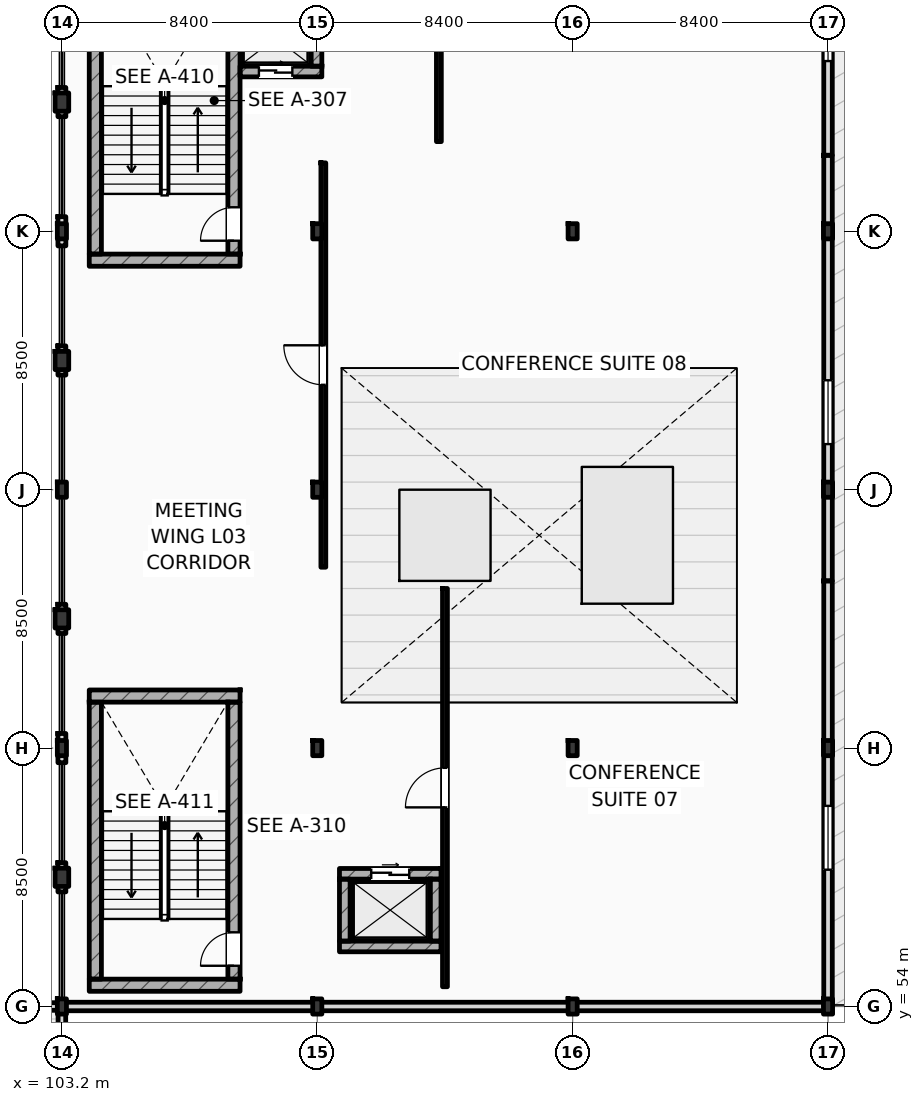
"""IFC4 building model, lengths in metres.
Left out: names, types, materials, properties, quantities, classifications, styles, units other than length and angle.
Written with IfcOpenShell. Run it as: python <this file> out.ifc"""

import sys

from ifc_helpers import new_model, si_unit, direction, frame, frame_2d, origin, origin_2d, place, context, subcontext, project, spatial, rectangle, i_section, extrude, element, fill, save


model = new_model("IFC4")
c1 = context("Model", 3, precision=1e-05, world=origin(), true_north=direction((0.0, 1.0)))
c2 = subcontext(c1, "Body", "Model", "MODEL_VIEW")
j1 = project(units=[si_unit("LENGTHUNIT", "METRE"), si_unit("PLANEANGLEUNIT", "RADIAN")], contexts=[c1])
p1 = place(None, origin())
s1 = spatial("IfcSite", under=j1, at=p1, CompositionType="ELEMENT")
p2 = place(p1, origin())
s2 = spatial("IfcBuilding", under=s1, at=p2, CompositionType="ELEMENT")
p3 = place(p2, frame((0.0, 0.0, 16.2)))
s3 = spatial("IfcBuildingStorey", under=s2, at=p3, CompositionType="ELEMENT", Elevation=16.2)
for number, where, z_axis, x_axis in (
    (1, (103.2, 54.0, 0.0), (0.0, 0.0, 1.0), (1.0, 0.0, 0.0)),
    (2, (103.2, 62.5, 0.0), (0.0, 0.0, 1.0), (1.0, 0.0, 0.0)),
    (3, (103.2, 71.0, 0.0), (0.0, 0.0, 1.0), (1.0, 0.0, 0.0)),
    (4, (103.2, 79.5, 0.0), (0.0, 0.0, 1.0), (1.0, 0.0, 0.0)),
    (5, (111.6, 54.0, 0.0), (0.0, 0.0, 1.0), (1.0, 0.0, 0.0)),
    (6, (111.6, 62.5, 0.0), (0.0, 0.0, 1.0), (1.0, 0.0, 0.0)),
    (7, (111.6, 71.0, 0.0), (0.0, 0.0, 1.0), (1.0, 0.0, 0.0)),
    (8, (111.6, 79.5, 0.0), (0.0, 0.0, 1.0), (1.0, 0.0, 0.0)),
    (9, (120.0, 54.0, 0.0), (0.0, 0.0, 1.0), (1.0, 0.0, 0.0)),
    (10, (120.0, 62.5, 0.0), (0.0, 0.0, 1.0), (1.0, 0.0, 0.0)),
    (11, (120.0, 79.5, 0.0), (0.0, 0.0, 1.0), (1.0, 0.0, 0.0)),
    (12, (128.4, 54.0, 0.0), (0.0, 0.0, 1.0), (1.0, 0.0, 0.0)),
    (13, (128.4, 62.5, 0.0), (0.0, 0.0, 1.0), (1.0, 0.0, 0.0)),
    (14, (128.4, 71.0, 0.0), (0.0, 0.0, 1.0), (1.0, 0.0, 0.0)),
    (15, (128.4, 79.5, 0.0), (0.0, 0.0, 1.0), (1.0, 0.0, 0.0)),
):
    element("IfcColumn", number, at=place(p3, frame(where, z_axis=z_axis, x_axis=x_axis)), inside=s3, PredefinedType="COLUMN", context=c2, shape_type="SweptSolid", body=[
        extrude(i_section(OverallWidth=0.3, OverallDepth=0.5, WebThickness=0.014, FlangeThickness=0.028, FilletRadius=0.027, at=origin_2d()), origin(), (0.0, 0.0, 1.0), 4.2),
    ])
for number, where, z_axis, x_axis in (
    (16, (103.2, 58.25, 0.0), (0.0, 0.0, 1.0), (1.0, 0.0, 0.0)),
    (17, (103.2, 66.75, 0.0), (0.0, 0.0, 1.0), (1.0, 0.0, 0.0)),
    (18, (103.2, 75.25, 0.0), (0.0, 0.0, 1.0), (1.0, 0.0, 0.0)),
    (19, (103.2, 83.75, 0.0), (0.0, 0.0, 1.0), (1.0, 0.0, 0.0)),
):
    element("IfcColumn", number, at=place(p3, frame(where, z_axis=z_axis, x_axis=x_axis)), inside=s3, PredefinedType="PILASTER", context=c2, shape_type="SweptSolid", body=[
        extrude(rectangle(XDim=0.45, YDim=0.6, at=origin_2d()), origin(), (0.0, 0.0, 1.0), 4.2),
    ])
p4 = place(p3, frame((104.1, 78.55, 0.0), z_axis=(0.0, 0.0, 1.0), x_axis=(1.0, 0.0, 0.0)))
e20 = element("IfcWall", 20, at=p4, inside=s3, PredefinedType="SHEAR", context=c2, shape_type="SweptSolid", body=[
    extrude(rectangle(XDim=4.96, YDim=0.4, at=frame_2d((2.48, 0.0))), origin(), (0.0, 0.0, 1.0), 4.2),
])
p5 = place(p3, frame((104.3, 78.75, 0.0), z_axis=(0.0, 0.0, 1.0), x_axis=(0.0, 1.0, 0.0)))
e21 = element("IfcWall", 21, at=p5, inside=s3, PredefinedType="SHEAR", context=c2, shape_type="SweptSolid", body=[
    extrude(rectangle(XDim=9.112, YDim=0.4, at=frame_2d((4.556, 0.0))), origin(), (0.0, 0.0, 1.0), 4.2),
])
p6 = place(p3, frame((108.86, 78.75, 0.0), z_axis=(0.0, 0.0, 1.0), x_axis=(0.0, 1.0, 0.0)))
e22 = element("IfcWall", 22, at=p6, inside=s3, PredefinedType="SHEAR", context=c2, shape_type="SweptSolid", body=[
    extrude(rectangle(XDim=9.112, YDim=0.4, at=frame_2d((4.556, 0.0))), origin(), (0.0, 0.0, 1.0), 4.2),
])
p7 = place(p6, frame((0.44, 0.0, 0.0)))
e23 = element("IfcOpeningElement", 23, at=p7, cuts=e22, PredefinedType="OPENING", context=c2, shape_type="SweptSolid", body=[
    extrude(rectangle(XDim=1.1, YDim=2.2, at=frame_2d((0.55, 1.1))), frame((0.0, 0.21, 0.0), z_axis=(0.0, -1.0, 0.0), x_axis=(1.0, 0.0, 0.0)), (0.0, 0.0, 1.0), 0.42),
])
for number, where, z_axis, x_axis in (
    (24, (104.1, 64.212, 0.0), (0.0, 0.0, 1.0), (1.0, 0.0, 0.0)),
    (25, (104.1, 54.7, 0.0), (0.0, 0.0, 1.0), (1.0, 0.0, 0.0)),
):
    element("IfcWall", number, at=place(p3, frame(where, z_axis=z_axis, x_axis=x_axis)), inside=s3, PredefinedType="SHEAR", context=c2, shape_type="SweptSolid", body=[
        extrude(rectangle(XDim=4.96, YDim=0.4, at=frame_2d((2.48, 0.0))), origin(), (0.0, 0.0, 1.0), 4.2),
    ])
p8 = place(p3, frame((104.3, 54.9, 0.0), z_axis=(0.0, 0.0, 1.0), x_axis=(0.0, 1.0, 0.0)))
e26 = element("IfcWall", 26, at=p8, inside=s3, PredefinedType="SHEAR", context=c2, shape_type="SweptSolid", body=[
    extrude(rectangle(XDim=9.112, YDim=0.4, at=frame_2d((4.556, 0.0))), origin(), (0.0, 0.0, 1.0), 4.2),
])
p9 = place(p3, frame((108.86, 54.9, 0.0), z_axis=(0.0, 0.0, 1.0), x_axis=(0.0, 1.0, 0.0)))
e27 = element("IfcWall", 27, at=p9, inside=s3, PredefinedType="SHEAR", context=c2, shape_type="SweptSolid", body=[
    extrude(rectangle(XDim=9.112, YDim=0.4, at=frame_2d((4.556, 0.0))), origin(), (0.0, 0.0, 1.0), 4.2),
])
p10 = place(p9, frame((0.44, 0.0, 0.0)))
e28 = element("IfcOpeningElement", 28, at=p10, cuts=e27, PredefinedType="OPENING", context=c2, shape_type="SweptSolid", body=[
    extrude(rectangle(XDim=1.1, YDim=2.2, at=frame_2d((0.55, 1.1))), frame((0.0, 0.21, 0.0), z_axis=(0.0, -1.0, 0.0), x_axis=(1.0, 0.0, 0.0)), (0.0, 0.0, 1.0), 0.42),
])
for number, where, z_axis, x_axis in (
    (29, (103.2, 57.77, 0.0), (0.0, 0.0, 1.0), (0.0, 1.0, 0.0)),
    (30, (103.2, 62.02, 0.0), (0.0, 0.0, 1.0), (0.0, 1.0, 0.0)),
    (31, (103.2, 66.27, 0.0), (0.0, 0.0, 1.0), (0.0, 1.0, 0.0)),
    (32, (103.2, 74.77, 0.0), (0.0, 0.0, 1.0), (0.0, 1.0, 0.0)),
    (33, (103.2, 79.02, 0.0), (0.0, 0.0, 1.0), (0.0, 1.0, 0.0)),
    (34, (103.2, 83.27, 0.0), (0.0, 0.0, 1.0), (0.0, 1.0, 0.0)),
):
    element("IfcWall", number, at=place(p3, frame(where, z_axis=z_axis, x_axis=x_axis)), inside=s3, PredefinedType="STANDARD", context=c2, shape_type="SweptSolid", body=[
        extrude(rectangle(XDim=0.96, YDim=0.26, at=frame_2d((0.48, 0.0))), origin(), (0.0, 0.0, 1.0), 3.51),
    ])
p11 = place(p3, frame((103.2, 54.0, 0.0), z_axis=(0.0, 0.0, 1.0), x_axis=(1.0, 0.0, 0.0)))
e35 = element("IfcWall", 35, at=p11, inside=s3, PredefinedType="STANDARD", context=c2, shape_type="SweptSolid", body=[
    extrude(rectangle(XDim=25.2, YDim=0.28, at=frame_2d((12.6, 0.0))), origin(), (0.0, 0.0, 1.0), 3.36),
])
p12 = place(p3, frame((128.4, 54.0, 0.0), z_axis=(0.0, 0.0, 1.0), x_axis=(0.0, 1.0, 0.0)))
e36 = element("IfcWall", 36, at=p12, inside=s3, PredefinedType="STANDARD", context=c2, shape_type="SweptSolid", body=[
    extrude(rectangle(XDim=14.0, YDim=0.28, at=frame_2d((7.0, 0.0))), origin(), (0.0, 0.0, 1.0), 3.51),
])
p13 = place(p12, frame((4.5, 0.0, 1.0)))
e37 = element("IfcOpeningElement", 37, at=p13, cuts=e36, PredefinedType="OPENING", context=c2, shape_type="SweptSolid", body=[
    extrude(rectangle(XDim=2.1, YDim=2.0, at=frame_2d((1.05, 1.0))), frame((0.0, 0.15, 0.0), z_axis=(0.0, -1.0, 0.0), x_axis=(1.0, 0.0, 0.0)), (0.0, 0.0, 1.0), 0.3),
])
p14 = place(p3, frame((128.4, 68.0, 0.0), z_axis=(0.0, 0.0, 1.0), x_axis=(0.0, 1.0, 0.0)))
e38 = element("IfcWall", 38, at=p14, inside=s3, PredefinedType="STANDARD", context=c2, shape_type="SweptSolid", body=[
    extrude(rectangle(XDim=14.0, YDim=0.28, at=frame_2d((7.0, 0.0))), origin(), (0.0, 0.0, 1.0), 3.51),
])
p15 = place(p14, frame((4.5, 0.0, 1.0)))
e39 = element("IfcOpeningElement", 39, at=p15, cuts=e38, PredefinedType="OPENING", context=c2, shape_type="SweptSolid", body=[
    extrude(rectangle(XDim=2.1, YDim=2.0, at=frame_2d((1.05, 1.0))), frame((0.0, 0.15, 0.0), z_axis=(0.0, -1.0, 0.0), x_axis=(1.0, 0.0, 0.0)), (0.0, 0.0, 1.0), 0.3),
])
p16 = place(p3, frame((128.4, 82.0, 0.0), z_axis=(0.0, 0.0, 1.0), x_axis=(0.0, 1.0, 0.0)))
e40 = element("IfcWall", 40, at=p16, inside=s3, PredefinedType="STANDARD", context=c2, shape_type="SweptSolid", body=[
    extrude(rectangle(XDim=14.0, YDim=0.28, at=frame_2d((7.0, 0.0))), origin(), (0.0, 0.0, 1.0), 3.51),
])
p17 = place(p16, frame((3.1, 0.0, 1.0)))
e41 = element("IfcOpeningElement", 41, at=p17, cuts=e40, PredefinedType="OPENING", context=c2, shape_type="SweptSolid", body=[
    extrude(rectangle(XDim=2.1, YDim=2.0, at=frame_2d((1.05, 1.0))), frame((0.0, 0.15, 0.0), z_axis=(0.0, -1.0, 0.0), x_axis=(1.0, 0.0, 0.0)), (0.0, 0.0, 1.0), 0.3),
])
p18 = place(p3, frame((103.2, 5.979, 0.0), z_axis=(0.0, 0.0, 1.0), x_axis=(0.0, 1.0, 0.0)))
e42 = element("IfcWall", 42, at=p18, inside=s3, PredefinedType="PARAPET", context=c2, shape_type="SweptSolid", body=[
    extrude(rectangle(XDim=48.021, YDim=0.25, at=frame_2d((24.011, 0.0))), origin(), (0.0, 0.0, 1.0), 1.15),
])
p19 = place(p3, frame((103.2, 54.0, 0.0), z_axis=(0.0, 0.0, 1.0), x_axis=(-1.0, 0.0, 0.0)))
e43 = element("IfcWall", 43, at=p19, inside=s3, PredefinedType="PARAPET", context=c2, shape_type="SweptSolid", body=[
    extrude(rectangle(XDim=54.6, YDim=0.25, at=frame_2d((27.3, 0.0))), origin(), (0.0, 0.0, 1.0), 1.15),
])
p20 = place(p3, frame((109.06, 84.755, 0.0), z_axis=(0.0, 0.0, 1.0), x_axis=(1.0, 0.0, 0.0)))
e44 = element("IfcWall", 44, at=p20, inside=s3, PredefinedType="SHEAR", context=c2, shape_type="SweptSolid", body=[
    extrude(rectangle(XDim=2.69, YDim=0.35, at=frame_2d((1.345, 0.0))), origin(), (0.0, 0.0, 1.0), 3.92),
])
p21 = place(p20, frame((0.62, 0.0, 0.0)))
e45 = element("IfcOpeningElement", 45, at=p21, cuts=e44, PredefinedType="OPENING", context=c2, shape_type="SweptSolid", body=[
    extrude(rectangle(XDim=1.1, YDim=2.2, at=frame_2d((0.55, 1.1))), frame((0.0, 0.185, 0.0), z_axis=(0.0, -1.0, 0.0), x_axis=(1.0, 0.0, 0.0)), (0.0, 0.0, 1.0), 0.37),
])
p22 = place(p3, frame((111.575, 84.93, 0.0), z_axis=(0.0, 0.0, 1.0), x_axis=(0.0, 1.0, 0.0)))
e46 = element("IfcWall", 46, at=p22, inside=s3, PredefinedType="SHEAR", context=c2, shape_type="SweptSolid", body=[
    extrude(rectangle(XDim=1.84, YDim=0.35, at=frame_2d((0.92, 0.0))), origin(), (0.0, 0.0, 1.0), 3.51),
])
p23 = place(p3, frame((112.33, 58.365, 0.0), z_axis=(0.0, 0.0, 1.0), x_axis=(1.0, 0.0, 0.0)))
e47 = element("IfcWall", 47, at=p23, inside=s3, PredefinedType="SHEAR", context=c2, shape_type="SweptSolid", body=[
    extrude(rectangle(XDim=3.34, YDim=0.35, at=frame_2d((1.67, 0.0))), origin(), (0.0, 0.0, 1.0), 3.92),
])
p24 = place(p23, frame((1.045, 0.0, 0.0)))
e48 = element("IfcOpeningElement", 48, at=p24, cuts=e47, PredefinedType="OPENING", context=c2, shape_type="SweptSolid", body=[
    extrude(rectangle(XDim=1.25, YDim=2.25, at=frame_2d((0.625, 1.125))), frame((0.0, 0.185, 0.0), z_axis=(0.0, -1.0, 0.0), x_axis=(1.0, 0.0, 0.0)), (0.0, 0.0, 1.0), 0.37),
])
p25 = place(p3, frame((112.33, 55.975, 0.0), z_axis=(0.0, 0.0, 1.0), x_axis=(1.0, 0.0, 0.0)))
e49 = element("IfcWall", 49, at=p25, inside=s3, PredefinedType="SHEAR", context=c2, shape_type="SweptSolid", body=[
    extrude(rectangle(XDim=3.34, YDim=0.35, at=frame_2d((1.67, 0.0))), origin(), (0.0, 0.0, 1.0), 3.92),
])
for number, where, z_axis, x_axis in (
    (50, (112.505, 56.15, 0.0), (0.0, 0.0, 1.0), (0.0, 1.0, 0.0)),
    (51, (115.495, 56.15, 0.0), (0.0, 0.0, 1.0), (0.0, 1.0, 0.0)),
):
    element("IfcWall", number, at=place(p3, frame(where, z_axis=z_axis, x_axis=x_axis)), inside=s3, PredefinedType="SHEAR", context=c2, shape_type="SweptSolid", body=[
        extrude(rectangle(XDim=2.04, YDim=0.35, at=frame_2d((1.02, 0.0))), origin(), (0.0, 0.0, 1.0), 3.92),
    ])
p26 = place(p3, frame((115.8, 54.65, 0.0), z_axis=(0.0, 0.0, 1.0), x_axis=(0.0, 1.0, 0.0)))
e52 = element("IfcWall", 52, at=p26, inside=s3, PredefinedType="PARTITIONING", context=c2, shape_type="SweptSolid", body=[
    extrude(rectangle(XDim=13.1, YDim=0.16, at=frame_2d((6.55, 0.0))), origin(), (0.0, 0.0, 1.0), 3.92),
])
p27 = place(p26, frame((5.9, 0.0, 0.0)))
e53 = element("IfcOpeningElement", 53, at=p27, cuts=e52, PredefinedType="OPENING", context=c2, shape_type="SweptSolid", body=[
    extrude(rectangle(XDim=1.3, YDim=2.2, at=frame_2d((0.65, 1.1))), frame((0.0, 0.09, 0.0), z_axis=(0.0, -1.0, 0.0), x_axis=(1.0, 0.0, 0.0)), (0.0, 0.0, 1.0), 0.18),
])
p28 = place(p3, frame((111.8, 68.45, 0.0), z_axis=(0.0, 0.0, 1.0), x_axis=(0.0, 1.0, 0.0)))
e54 = element("IfcWall", 54, at=p28, inside=s3, PredefinedType="PARTITIONING", context=c2, shape_type="SweptSolid", body=[
    extrude(rectangle(XDim=13.3, YDim=0.16, at=frame_2d((6.65, 0.0))), origin(), (0.0, 0.0, 1.0), 3.51),
])
p29 = place(p28, frame((6.0, 0.0, 0.0)))
e55 = element("IfcOpeningElement", 55, at=p29, cuts=e54, PredefinedType="OPENING", context=c2, shape_type="SweptSolid", body=[
    extrude(rectangle(XDim=1.3, YDim=2.2, at=frame_2d((0.65, 1.1))), frame((0.0, 0.09, 0.0), z_axis=(0.0, -1.0, 0.0), x_axis=(1.0, 0.0, 0.0)), (0.0, 0.0, 1.0), 0.18),
])
p30 = place(p3, frame((115.6, 82.45, 0.0), z_axis=(0.0, 0.0, 1.0), x_axis=(0.0, 1.0, 0.0)))
e56 = element("IfcWall", 56, at=p30, inside=s3, PredefinedType="PARTITIONING", context=c2, shape_type="SweptSolid", body=[
    extrude(rectangle(XDim=12.9, YDim=0.16, at=frame_2d((6.45, 0.0))), origin(), (0.0, 0.0, 1.0), 3.92),
])
p31 = place(p30, frame((5.8, 0.0, 0.0)))
e57 = element("IfcOpeningElement", 57, at=p31, cuts=e56, PredefinedType="OPENING", context=c2, shape_type="SweptSolid", body=[
    extrude(rectangle(XDim=1.3, YDim=2.2, at=frame_2d((0.65, 1.1))), frame((0.0, 0.09, 0.0), z_axis=(0.0, -1.0, 0.0), x_axis=(1.0, 0.0, 0.0)), (0.0, 0.0, 1.0), 0.18),
])
p32 = place(p13, origin())
e58 = element("IfcWindow", 58, at=p32, inside=s3, PartitioningType="DOUBLE_PANEL_VERTICAL", PredefinedType="WINDOW", context=c2, shape_type="SweptSolid", body=[
    extrude(rectangle(XDim=2.1, YDim=2.0, at=frame_2d((1.05, 1.0))), frame((0.0, 0.03, 0.0), z_axis=(0.0, -1.0, 0.0), x_axis=(1.0, 0.0, 0.0)), (0.0, 0.0, 1.0), 0.06),
])
fill(e37, e58)
p33 = place(p15, origin())
e59 = element("IfcWindow", 59, at=p33, inside=s3, PartitioningType="DOUBLE_PANEL_VERTICAL", PredefinedType="WINDOW", context=c2, shape_type="SweptSolid", body=[
    extrude(rectangle(XDim=2.1, YDim=2.0, at=frame_2d((1.05, 1.0))), frame((0.0, 0.03, 0.0), z_axis=(0.0, -1.0, 0.0), x_axis=(1.0, 0.0, 0.0)), (0.0, 0.0, 1.0), 0.06),
])
fill(e39, e59)
p34 = place(p17, origin())
e60 = element("IfcWindow", 60, at=p34, inside=s3, PartitioningType="DOUBLE_PANEL_VERTICAL", PredefinedType="WINDOW", context=c2, shape_type="SweptSolid", body=[
    extrude(rectangle(XDim=2.1, YDim=2.0, at=frame_2d((1.05, 1.0))), frame((0.0, 0.03, 0.0), z_axis=(0.0, -1.0, 0.0), x_axis=(1.0, 0.0, 0.0)), (0.0, 0.0, 1.0), 0.06),
])
fill(e41, e60)
p35 = place(p3, frame((0.0, 0.0, -0.26)))
p36 = place(p35, frame((115.8, 69.5, -0.01)))
p37 = place(p36, frame((0.0, 0.0, 0.22)))
e61 = element("IfcWindow", 61, at=p37, inside=s3, PartitioningType="SINGLE_PANEL", PredefinedType="SKYLIGHT", context=c2, shape_type="SweptSolid", body=[
    extrude(rectangle(XDim=3.0, YDim=3.0, at=origin_2d()), origin(), (0.0, 0.0, 1.0), 0.05),
])
p38 = place(p35, frame((121.8, 69.5, -0.01)))
p39 = place(p38, frame((0.0, 0.0, 0.22)))
e62 = element("IfcWindow", 62, at=p39, inside=s3, PartitioningType="SINGLE_PANEL", PredefinedType="SKYLIGHT", context=c2, shape_type="SweptSolid", body=[
    extrude(rectangle(XDim=3.0, YDim=4.5, at=origin_2d()), origin(), (0.0, 0.0, 1.0), 0.05),
])
p40 = place(p7, origin())
e63 = element("IfcDoor", 63, at=p40, inside=s3, OperationType="SINGLE_SWING_LEFT", PredefinedType="DOOR", context=c2, shape_type="SweptSolid", body=[
    extrude(rectangle(XDim=1.1, YDim=2.2, at=frame_2d((0.55, 1.1))), frame((0.0, 0.025, 0.0), z_axis=(0.0, -1.0, 0.0), x_axis=(1.0, 0.0, 0.0)), (0.0, 0.0, 1.0), 0.05),
])
fill(e23, e63)
p41 = place(p10, origin())
e64 = element("IfcDoor", 64, at=p41, inside=s3, OperationType="SINGLE_SWING_LEFT", PredefinedType="DOOR", context=c2, shape_type="SweptSolid", body=[
    extrude(rectangle(XDim=1.1, YDim=2.2, at=frame_2d((0.55, 1.1))), frame((0.0, 0.025, 0.0), z_axis=(0.0, -1.0, 0.0), x_axis=(1.0, 0.0, 0.0)), (0.0, 0.0, 1.0), 0.05),
])
fill(e28, e64)
p42 = place(p21, origin())
e65 = element("IfcDoor", 65, at=p42, inside=s3, OperationType="SLIDING_TO_LEFT", PredefinedType="DOOR", context=c2, shape_type="SweptSolid", body=[
    extrude(rectangle(XDim=1.1, YDim=2.2, at=frame_2d((0.55, 1.1))), frame((0.0, 0.025, 0.0), z_axis=(0.0, -1.0, 0.0), x_axis=(1.0, 0.0, 0.0)), (0.0, 0.0, 1.0), 0.05),
])
fill(e45, e65)
p43 = place(p24, origin())
e66 = element("IfcDoor", 66, at=p43, inside=s3, OperationType="SLIDING_TO_LEFT", PredefinedType="DOOR", context=c2, shape_type="SweptSolid", body=[
    extrude(rectangle(XDim=1.25, YDim=2.25, at=frame_2d((0.625, 1.125))), frame((0.0, 0.025, 0.0), z_axis=(0.0, -1.0, 0.0), x_axis=(1.0, 0.0, 0.0)), (0.0, 0.0, 1.0), 0.05),
])
fill(e48, e66)
p44 = place(p27, origin())
e67 = element("IfcDoor", 67, at=p44, inside=s3, OperationType="SINGLE_SWING_LEFT", PredefinedType="DOOR", context=c2, shape_type="SweptSolid", body=[
    extrude(rectangle(XDim=1.3, YDim=2.2, at=frame_2d((0.65, 1.1))), frame((0.0, 0.025, 0.0), z_axis=(0.0, -1.0, 0.0), x_axis=(1.0, 0.0, 0.0)), (0.0, 0.0, 1.0), 0.05),
])
fill(e53, e67)
p45 = place(p29, origin())
e68 = element("IfcDoor", 68, at=p45, inside=s3, OperationType="SINGLE_SWING_RIGHT", PredefinedType="DOOR", context=c2, shape_type="SweptSolid", body=[
    extrude(rectangle(XDim=1.3, YDim=2.2, at=frame_2d((0.65, 1.1))), frame((0.0, 0.025, 0.0), z_axis=(0.0, -1.0, 0.0), x_axis=(1.0, 0.0, 0.0)), (0.0, 0.0, 1.0), 0.05),
])
fill(e55, e68)
save(model, sys.argv[1])
